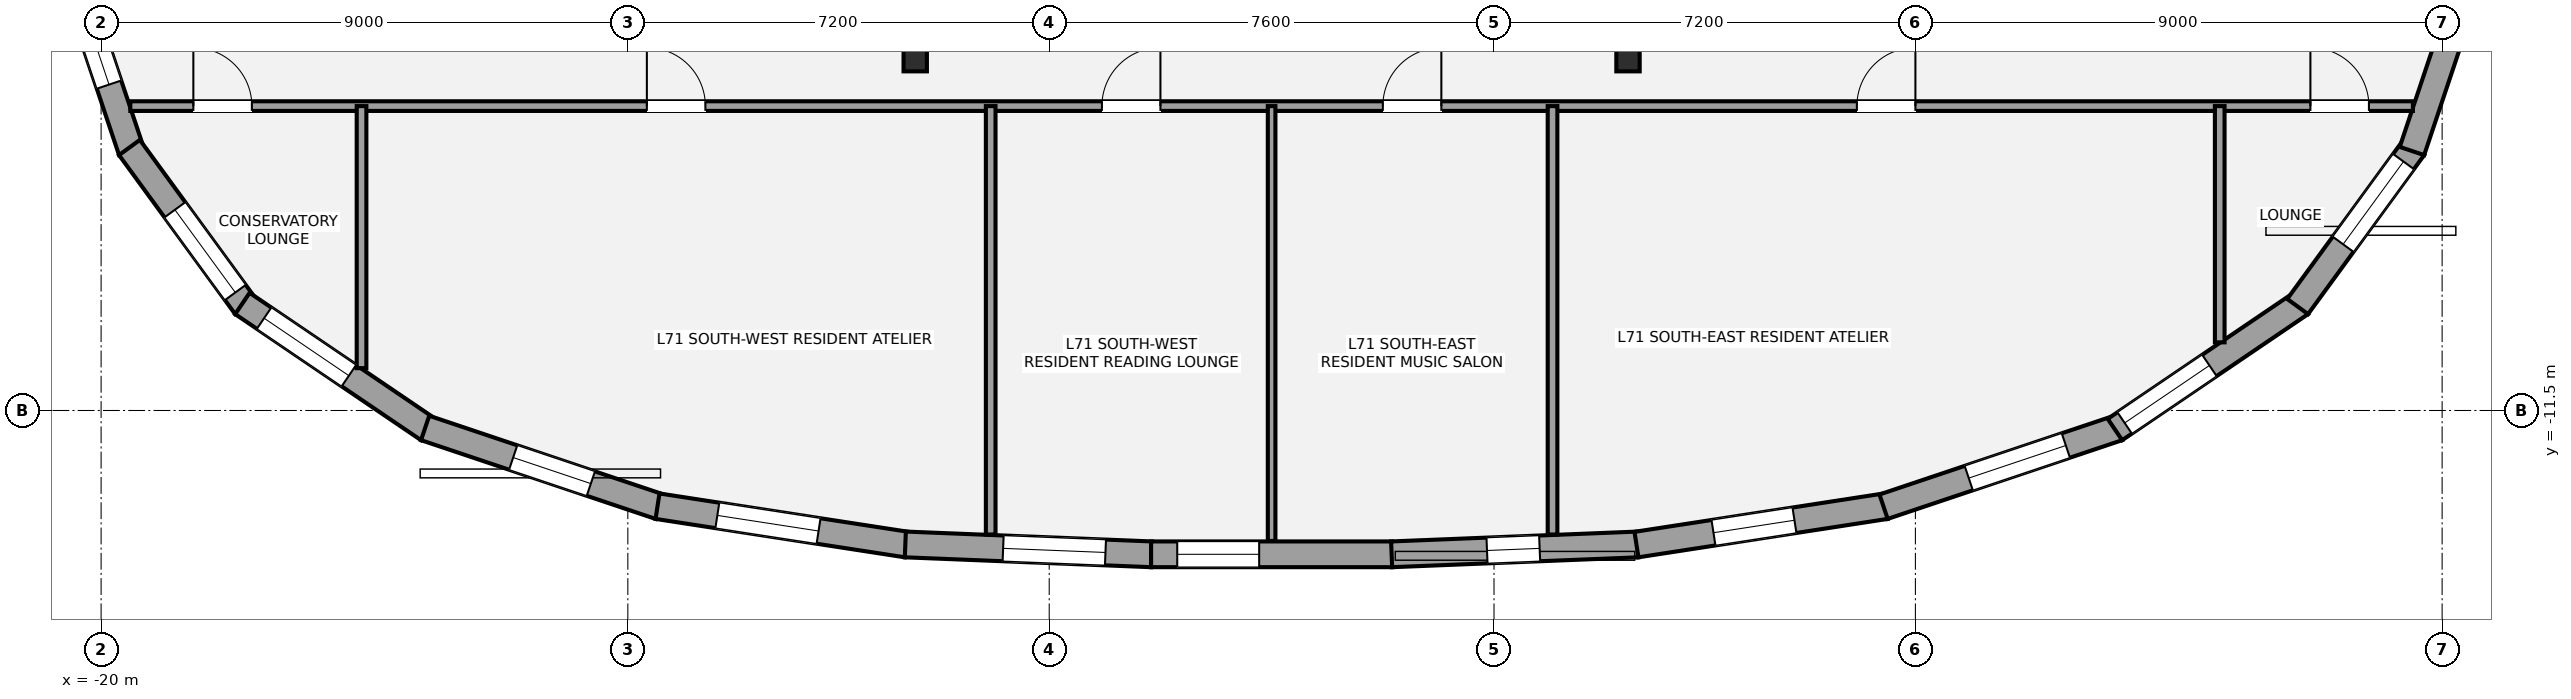
"""IFC4 building model, lengths in metres.
Left out: names, types, materials, properties, quantities, classifications, styles, units other than length and angle.
Written with IfcOpenShell. Run it as: python <this file> out.ifc"""

import sys

from ifc_helpers import new_model, si_unit, direction, frame, frame_2d, origin, origin_2d, place, context, subcontext, project, spatial, rectangle, i_section, extrude, element, fill, save


model = new_model("IFC4")
c1 = context("Model", 3, precision=1e-05, world=origin(), true_north=direction((0.0, 1.0)))
c2 = subcontext(c1, "Body", "Model", "MODEL_VIEW")
j1 = project(units=[si_unit("LENGTHUNIT", "METRE"), si_unit("PLANEANGLEUNIT", "RADIAN")], contexts=[c1])
p1 = place(None, origin())
s1 = spatial("IfcSite", under=j1, at=p1, CompositionType="ELEMENT")
p2 = place(p1, origin())
s2 = spatial("IfcBuilding", under=s1, at=p2, CompositionType="ELEMENT")
p3 = place(p2, frame((0.0, 0.0, 250.95)))
s3 = spatial("IfcBuildingStorey", under=s2, at=p3, CompositionType="ELEMENT", Elevation=250.95)
for number, where, z_axis, x_axis in (
    (1, (-6.09, -5.513, 0.0), (0.0, 0.0, 1.0), (1.0, 0.0, 0.0)),
    (2, (6.09, -5.513, 0.0), (0.0, 0.0, 1.0), (1.0, 0.0, 0.0)),
):
    element("IfcColumn", number, at=place(p3, frame(where, z_axis=z_axis, x_axis=x_axis)), inside=s3, PredefinedType="COLUMN", context=c2, shape_type="SweptSolid", body=[
        extrude(i_section(OverallWidth=0.399, OverallDepth=0.387, WebThickness=0.021, FlangeThickness=0.033, at=origin_2d()), origin(), (0.0, 0.0, 1.0), 3.15),
    ])
p4 = place(p3, frame((-19.485, -7.067, 0.0), z_axis=(0.0, 0.0, 1.0), x_axis=(-0.317622332961, 0.948217302945, 0.0)))
e3 = element("IfcWall", 3, at=p4, inside=s3, PredefinedType="STANDARD", context=c2, shape_type="SweptSolid", body=[
    extrude(rectangle(XDim=3.045, YDim=0.44, at=frame_2d((1.523, 0.0))), origin(), (0.0, 0.0, 1.0), 2.336),
])
p5 = place(p4, frame((1.196, 0.0, 0.58)))
e4 = element("IfcOpeningElement", 4, at=p5, cuts=e3, PredefinedType="OPENING", context=c2, shape_type="SweptSolid", body=[
    extrude(rectangle(XDim=1.4, YDim=1.55, at=frame_2d((0.7, 0.775))), frame((0.0, 0.23, 0.0), z_axis=(0.0, -1.0, 0.0), x_axis=(1.0, 0.0, 0.0)), (0.0, 0.0, 1.0), 0.46),
])
p6 = place(p3, frame((-17.531, -9.724, 0.0), z_axis=(0.0, 0.0, 1.0), x_axis=(-0.589698134284, 0.807623743102, 0.0)))
e5 = element("IfcWall", 5, at=p6, inside=s3, PredefinedType="STANDARD", context=c2, shape_type="SweptSolid", body=[
    extrude(rectangle(XDim=3.364, YDim=0.44, at=frame_2d((1.682, 0.0))), origin(), (0.0, 0.0, 1.0), 2.336),
])
p7 = place(p6, frame((0.297, 0.0, 0.55)))
e6 = element("IfcOpeningElement", 6, at=p7, cuts=e5, PredefinedType="OPENING", context=c2, shape_type="SweptSolid", body=[
    extrude(rectangle(XDim=1.75, YDim=1.55, at=frame_2d((0.875, 0.775))), frame((0.0, 0.23, 0.0), z_axis=(0.0, -1.0, 0.0), x_axis=(1.0, 0.0, 0.0)), (0.0, 0.0, 1.0), 0.46),
])
p8 = place(p3, frame((-14.41, -11.825, 0.0), z_axis=(0.0, 0.0, 1.0), x_axis=(-0.827707997274, 0.56115904274, 0.0)))
e7 = element("IfcWall", 7, at=p8, inside=s3, PredefinedType="STANDARD", context=c2, shape_type="SweptSolid", body=[
    extrude(rectangle(XDim=3.837, YDim=0.44, at=frame_2d((1.918, 0.0))), origin(), (0.0, 0.0, 1.0), 2.336),
])
p9 = place(p8, frame((1.639, 0.0, 0.55)))
e8 = element("IfcOpeningElement", 8, at=p9, cuts=e7, PredefinedType="OPENING", context=c2, shape_type="SweptSolid", body=[
    extrude(rectangle(XDim=1.75, YDim=1.55, at=frame_2d((0.875, 0.775))), frame((0.0, 0.23, 0.0), z_axis=(0.0, -1.0, 0.0), x_axis=(1.0, 0.0, 0.0)), (0.0, 0.0, 1.0), 0.46),
])
p10 = place(p3, frame((-10.456, -13.144, 0.0), z_axis=(0.0, 0.0, 1.0), x_axis=(-0.948005346594, 0.318254399545, 0.0)))
e9 = element("IfcWall", 9, at=p10, inside=s3, PredefinedType="STANDARD", context=c2, shape_type="SweptSolid", body=[
    extrude(rectangle(XDim=4.227, YDim=0.44, at=frame_2d((2.113, 0.0))), origin(), (0.0, 0.0, 1.0), 2.336),
])
p11 = place(p10, frame((1.24, 0.0, 0.55)))
e10 = element("IfcOpeningElement", 10, at=p11, cuts=e9, PredefinedType="OPENING", context=c2, shape_type="SweptSolid", body=[
    extrude(rectangle(XDim=1.4, YDim=1.55, at=frame_2d((0.7, 0.775))), frame((0.0, 0.23, 0.0), z_axis=(0.0, -1.0, 0.0), x_axis=(1.0, 0.0, 0.0)), (0.0, 0.0, 1.0), 0.46),
])
p12 = place(p3, frame((-6.234, -13.791, 0.0), z_axis=(0.0, 0.0, 1.0), x_axis=(-0.988352039028, 0.152184910389, 0.0)))
e11 = element("IfcWall", 11, at=p12, inside=s3, PredefinedType="STANDARD", context=c2, shape_type="SweptSolid", body=[
    extrude(rectangle(XDim=4.309, YDim=0.44, at=frame_2d((2.155, 0.0))), origin(), (0.0, 0.0, 1.0), 2.336),
])
p13 = place(p12, frame((1.525, 0.0, 0.55)))
e12 = element("IfcOpeningElement", 12, at=p13, cuts=e11, PredefinedType="OPENING", context=c2, shape_type="SweptSolid", body=[
    extrude(rectangle(XDim=1.75, YDim=1.55, at=frame_2d((0.875, 0.775))), frame((0.0, 0.23, 0.0), z_axis=(0.0, -1.0, 0.0), x_axis=(1.0, 0.0, 0.0)), (0.0, 0.0, 1.0), 0.46),
])
p14 = place(p3, frame((-2.051, -13.957, 0.0), z_axis=(0.0, 0.0, 1.0), x_axis=(-0.999195020948, 0.040116207618, 0.0)))
e13 = element("IfcWall", 13, at=p14, inside=s3, PredefinedType="STANDARD", context=c2, shape_type="SweptSolid", body=[
    extrude(rectangle(XDim=4.211, YDim=0.44, at=frame_2d((2.106, 0.0))), origin(), (0.0, 0.0, 1.0), 2.336),
])
p15 = place(p14, frame((0.789, 0.0, 0.55)))
e14 = element("IfcOpeningElement", 14, at=p15, cuts=e13, PredefinedType="OPENING", context=c2, shape_type="SweptSolid", body=[
    extrude(rectangle(XDim=1.75, YDim=1.55, at=frame_2d((0.875, 0.775))), frame((0.0, 0.23, 0.0), z_axis=(0.0, -1.0, 0.0), x_axis=(1.0, 0.0, 0.0)), (0.0, 0.0, 1.0), 0.46),
])
p16 = place(p3, frame((2.059, -13.957, 0.0), z_axis=(0.0, 0.0, 1.0), x_axis=(-1.0, 0.0, 0.0)))
e15 = element("IfcWall", 15, at=p16, inside=s3, PredefinedType="STANDARD", context=c2, shape_type="SweptSolid", body=[
    extrude(rectangle(XDim=4.119, YDim=0.44, at=frame_2d((2.059, 0.0))), origin(), (0.0, 0.0, 1.0), 2.336),
])
p17 = place(p16, frame((2.272, 0.0, 0.58)))
e16 = element("IfcOpeningElement", 16, at=p17, cuts=e15, PredefinedType="OPENING", context=c2, shape_type="SweptSolid", body=[
    extrude(rectangle(XDim=1.4, YDim=1.55, at=frame_2d((0.7, 0.775))), frame((0.0, 0.23, 0.0), z_axis=(0.0, -1.0, 0.0), x_axis=(1.0, 0.0, 0.0)), (0.0, 0.0, 1.0), 0.46),
])
p18 = place(p3, frame((6.259, -13.788, 0.0), z_axis=(0.0, 0.0, 1.0), x_axis=(-0.999195020948, -0.040116207618, 0.0)))
e17 = element("IfcWall", 17, at=p18, inside=s3, PredefinedType="STANDARD", context=c2, shape_type="SweptSolid", body=[
    extrude(rectangle(XDim=4.211, YDim=0.44, at=frame_2d((2.106, 0.0))), origin(), (0.0, 0.0, 1.0), 2.336),
])
p19 = place(p18, frame((1.68, 0.0, 0.58)))
e18 = element("IfcOpeningElement", 18, at=p19, cuts=e17, PredefinedType="OPENING", context=c2, shape_type="SweptSolid", body=[
    extrude(rectangle(XDim=0.9, YDim=1.35, at=frame_2d((0.45, 0.675))), frame((0.0, 0.23, 0.0), z_axis=(0.0, -1.0, 0.0), x_axis=(1.0, 0.0, 0.0)), (0.0, 0.0, 1.0), 0.46),
])
p20 = place(p3, frame((10.493, -13.135, 0.0), z_axis=(0.0, 0.0, 1.0), x_axis=(-0.988352039028, -0.152184910389, 0.0)))
e19 = element("IfcWall", 19, at=p20, inside=s3, PredefinedType="STANDARD", context=c2, shape_type="SweptSolid", body=[
    extrude(rectangle(XDim=4.309, YDim=0.44, at=frame_2d((2.155, 0.0))), origin(), (0.0, 0.0, 1.0), 2.336),
])
p21 = place(p20, frame((1.577, 0.0, 0.55)))
e20 = element("IfcOpeningElement", 20, at=p21, cuts=e19, PredefinedType="OPENING", context=c2, shape_type="SweptSolid", body=[
    extrude(rectangle(XDim=1.4, YDim=1.55, at=frame_2d((0.7, 0.775))), frame((0.0, 0.23, 0.0), z_axis=(0.0, -1.0, 0.0), x_axis=(1.0, 0.0, 0.0)), (0.0, 0.0, 1.0), 0.46),
])
p22 = place(p3, frame((14.463, -11.799, 0.0), z_axis=(0.0, 0.0, 1.0), x_axis=(-0.948005346594, -0.318254399545, 0.0)))
e21 = element("IfcWall", 21, at=p22, inside=s3, PredefinedType="STANDARD", context=c2, shape_type="SweptSolid", body=[
    extrude(rectangle(XDim=4.227, YDim=0.44, at=frame_2d((2.113, 0.0))), origin(), (0.0, 0.0, 1.0), 2.336),
])
p23 = place(p22, frame((0.942, 0.0, 0.55)))
e22 = element("IfcOpeningElement", 22, at=p23, cuts=e21, PredefinedType="OPENING", context=c2, shape_type="SweptSolid", body=[
    extrude(rectangle(XDim=1.75, YDim=1.55, at=frame_2d((0.875, 0.775))), frame((0.0, 0.23, 0.0), z_axis=(0.0, -1.0, 0.0), x_axis=(1.0, 0.0, 0.0)), (0.0, 0.0, 1.0), 0.46),
])
p24 = place(p3, frame((17.586, -9.672, 0.0), z_axis=(0.0, 0.0, 1.0), x_axis=(-0.827707997274, -0.56115904274, 0.0)))
e23 = element("IfcWall", 23, at=p24, inside=s3, PredefinedType="STANDARD", context=c2, shape_type="SweptSolid", body=[
    extrude(rectangle(XDim=3.837, YDim=0.44, at=frame_2d((1.918, 0.0))), origin(), (0.0, 0.0, 1.0), 2.336),
])
p25 = place(p24, frame((1.887, 0.0, 0.55)))
e24 = element("IfcOpeningElement", 24, at=p25, cuts=e23, PredefinedType="OPENING", context=c2, shape_type="SweptSolid", body=[
    extrude(rectangle(XDim=1.75, YDim=1.55, at=frame_2d((0.875, 0.775))), frame((0.0, 0.23, 0.0), z_axis=(0.0, -1.0, 0.0), x_axis=(1.0, 0.0, 0.0)), (0.0, 0.0, 1.0), 0.46),
])
p26 = place(p3, frame((19.515, -7.007, 0.0), z_axis=(0.0, 0.0, 1.0), x_axis=(-0.589698134284, -0.807623743102, 0.0)))
e25 = element("IfcWall", 25, at=p26, inside=s3, PredefinedType="STANDARD", context=c2, shape_type="SweptSolid", body=[
    extrude(rectangle(XDim=3.364, YDim=0.44, at=frame_2d((1.682, 0.0))), origin(), (0.0, 0.0, 1.0), 2.336),
])
p27 = place(p26, frame((0.297, 0.0, 0.55)))
e26 = element("IfcOpeningElement", 26, at=p27, cuts=e25, PredefinedType="OPENING", context=c2, shape_type="SweptSolid", body=[
    extrude(rectangle(XDim=1.75, YDim=1.55, at=frame_2d((0.875, 0.775))), frame((0.0, 0.23, 0.0), z_axis=(0.0, -1.0, 0.0), x_axis=(1.0, 0.0, 0.0)), (0.0, 0.0, 1.0), 0.46),
])
p28 = place(p3, frame((20.452, -4.179, 0.0), z_axis=(0.0, 0.0, 1.0), x_axis=(-0.317622332961, -0.948217302945, 0.0)))
e27 = element("IfcWall", 27, at=p28, inside=s3, PredefinedType="STANDARD", context=c2, shape_type="SweptSolid", body=[
    extrude(rectangle(XDim=3.045, YDim=0.44, at=frame_2d((1.523, 0.0))), origin(), (0.0, 0.0, 1.0), 2.336),
])
p29 = place(p3, frame((-19.501, -6.3, 0.0), z_axis=(0.0, 0.0, 1.0), x_axis=(1.0, 0.0, 0.0)))
e28 = element("IfcWall", 28, at=p29, inside=s3, PredefinedType="PARTITIONING", context=c2, shape_type="SweptSolid", body=[
    extrude(rectangle(XDim=39.002, YDim=0.165, at=frame_2d((19.501, 0.0))), origin(), (0.0, 0.0, 1.0), 2.423),
])
p30 = place(p29, frame((1.077, 0.0, 0.0)))
e29 = element("IfcOpeningElement", 29, at=p30, cuts=e28, PredefinedType="OPENING", context=c2, shape_type="SweptSolid", body=[
    extrude(rectangle(XDim=1.0, YDim=2.15, at=frame_2d((0.5, 1.075))), frame((0.0, 0.093, 0.0), z_axis=(0.0, -1.0, 0.0), x_axis=(1.0, 0.0, 0.0)), (0.0, 0.0, 1.0), 0.185),
])
p31 = place(p29, frame((37.25, 0.0, 0.0)))
e30 = element("IfcOpeningElement", 30, at=p31, cuts=e28, PredefinedType="OPENING", context=c2, shape_type="SweptSolid", body=[
    extrude(rectangle(XDim=1.0, YDim=2.15, at=frame_2d((0.5, 1.075))), frame((0.0, 0.093, 0.0), z_axis=(0.0, -1.0, 0.0), x_axis=(1.0, 0.0, 0.0)), (0.0, 0.0, 1.0), 0.185),
])
p32 = place(p29, frame((16.601, 0.0, 0.0)))
e31 = element("IfcOpeningElement", 31, at=p32, cuts=e28, PredefinedType="OPENING", context=c2, shape_type="SweptSolid", body=[
    extrude(rectangle(XDim=1.0, YDim=2.15, at=frame_2d((0.5, 1.075))), frame((0.0, 0.093, 0.0), z_axis=(0.0, -1.0, 0.0), x_axis=(1.0, 0.0, 0.0)), (0.0, 0.0, 1.0), 0.185),
])
p33 = place(p29, frame((21.401, 0.0, 0.0)))
e32 = element("IfcOpeningElement", 32, at=p33, cuts=e28, PredefinedType="OPENING", context=c2, shape_type="SweptSolid", body=[
    extrude(rectangle(XDim=1.0, YDim=2.15, at=frame_2d((0.5, 1.075))), frame((0.0, 0.093, 0.0), z_axis=(0.0, -1.0, 0.0), x_axis=(1.0, 0.0, 0.0)), (0.0, 0.0, 1.0), 0.185),
])
p34 = place(p29, frame((8.826, 0.0, 0.0)))
e33 = element("IfcOpeningElement", 33, at=p34, cuts=e28, PredefinedType="OPENING", context=c2, shape_type="SweptSolid", body=[
    extrude(rectangle(XDim=1.0, YDim=2.15, at=frame_2d((0.5, 1.075))), frame((0.0, 0.093, 0.0), z_axis=(0.0, -1.0, 0.0), x_axis=(1.0, 0.0, 0.0)), (0.0, 0.0, 1.0), 0.185),
])
p35 = place(p29, frame((29.501, 0.0, 0.0)))
e34 = element("IfcOpeningElement", 34, at=p35, cuts=e28, PredefinedType="OPENING", context=c2, shape_type="SweptSolid", body=[
    extrude(rectangle(XDim=1.0, YDim=2.15, at=frame_2d((0.5, 1.075))), frame((0.0, 0.093, 0.0), z_axis=(0.0, -1.0, 0.0), x_axis=(1.0, 0.0, 0.0)), (0.0, 0.0, 1.0), 0.185),
])
p36 = place(p3, frame((-15.55, -10.777, 0.0), z_axis=(0.0, 0.0, 1.0), x_axis=(0.0, 1.0, 0.0)))
e35 = element("IfcWall", 35, at=p36, inside=s3, PredefinedType="PARTITIONING", context=c2, shape_type="SweptSolid", body=[
    extrude(rectangle(XDim=4.477, YDim=0.165, at=frame_2d((2.238, 0.0))), origin(), (0.0, 0.0, 1.0), 2.423),
])
p37 = place(p3, frame((16.2, -10.336, 0.0), z_axis=(0.0, 0.0, 1.0), x_axis=(0.0, 1.0, 0.0)))
e36 = element("IfcWall", 36, at=p37, inside=s3, PredefinedType="PARTITIONING", context=c2, shape_type="SweptSolid", body=[
    extrude(rectangle(XDim=4.036, YDim=0.165, at=frame_2d((2.018, 0.0))), origin(), (0.0, 0.0, 1.0), 2.423),
])
p38 = place(p3, frame((-4.8, -13.619, 0.0), z_axis=(0.0, 0.0, 1.0), x_axis=(0.0, 1.0, 0.0)))
e37 = element("IfcWall", 37, at=p38, inside=s3, PredefinedType="PARTITIONING", context=c2, shape_type="SweptSolid", body=[
    extrude(rectangle(XDim=7.319, YDim=0.165, at=frame_2d((3.659, 0.0))), origin(), (0.0, 0.0, 1.0), 2.423),
])
p39 = place(p3, frame((4.8, -13.619, 0.0), z_axis=(0.0, 0.0, 1.0), x_axis=(0.0, 1.0, 0.0)))
e38 = element("IfcWall", 38, at=p39, inside=s3, PredefinedType="PARTITIONING", context=c2, shape_type="SweptSolid", body=[
    extrude(rectangle(XDim=7.319, YDim=0.165, at=frame_2d((3.659, 0.0))), origin(), (0.0, 0.0, 1.0), 2.97),
])
p40 = place(p3, frame((0.0, -13.729, 0.0), z_axis=(0.0, 0.0, 1.0), x_axis=(0.0, 1.0, 0.0)))
e39 = element("IfcWall", 39, at=p40, inside=s3, PredefinedType="PARTITIONING", context=c2, shape_type="SweptSolid", body=[
    extrude(rectangle(XDim=7.429, YDim=0.13, at=frame_2d((3.714, 0.0))), origin(), (0.0, 0.0, 1.0), 2.423),
])
p41 = place(p5, origin())
e40 = element("IfcWindow", 40, at=p41, inside=s3, PartitioningType="SINGLE_PANEL", PredefinedType="WINDOW", context=c2, shape_type="SweptSolid", body=[
    extrude(rectangle(XDim=1.4, YDim=1.55, at=frame_2d((0.7, 0.775))), frame((0.0, -0.01, 0.0), z_axis=(0.0, -1.0, 0.0), x_axis=(1.0, 0.0, 0.0)), (0.0, 0.0, 1.0), 0.06),
])
fill(e4, e40)
p42 = place(p7, origin())
e41 = element("IfcWindow", 41, at=p42, inside=s3, PartitioningType="SINGLE_PANEL", PredefinedType="WINDOW", context=c2, shape_type="SweptSolid", body=[
    extrude(rectangle(XDim=1.75, YDim=1.55, at=frame_2d((0.875, 0.775))), frame((0.0, -0.01, 0.0), z_axis=(0.0, -1.0, 0.0), x_axis=(1.0, 0.0, 0.0)), (0.0, 0.0, 1.0), 0.06),
])
fill(e6, e41)
p43 = place(p9, origin())
e42 = element("IfcWindow", 42, at=p43, inside=s3, PartitioningType="SINGLE_PANEL", PredefinedType="WINDOW", context=c2, shape_type="SweptSolid", body=[
    extrude(rectangle(XDim=1.75, YDim=1.55, at=frame_2d((0.875, 0.775))), frame((0.0, -0.01, 0.0), z_axis=(0.0, -1.0, 0.0), x_axis=(1.0, 0.0, 0.0)), (0.0, 0.0, 1.0), 0.06),
])
fill(e8, e42)
p44 = place(p11, origin())
e43 = element("IfcWindow", 43, at=p44, inside=s3, PartitioningType="SINGLE_PANEL", PredefinedType="WINDOW", context=c2, shape_type="SweptSolid", body=[
    extrude(rectangle(XDim=1.4, YDim=1.55, at=frame_2d((0.7, 0.775))), frame((0.0, -0.01, 0.0), z_axis=(0.0, -1.0, 0.0), x_axis=(1.0, 0.0, 0.0)), (0.0, 0.0, 1.0), 0.06),
])
fill(e10, e43)
p45 = place(p13, origin())
e44 = element("IfcWindow", 44, at=p45, inside=s3, PartitioningType="SINGLE_PANEL", PredefinedType="WINDOW", context=c2, shape_type="SweptSolid", body=[
    extrude(rectangle(XDim=1.75, YDim=1.55, at=frame_2d((0.875, 0.775))), frame((0.0, -0.01, 0.0), z_axis=(0.0, -1.0, 0.0), x_axis=(1.0, 0.0, 0.0)), (0.0, 0.0, 1.0), 0.06),
])
fill(e12, e44)
p46 = place(p15, origin())
e45 = element("IfcWindow", 45, at=p46, inside=s3, PartitioningType="SINGLE_PANEL", PredefinedType="WINDOW", context=c2, shape_type="SweptSolid", body=[
    extrude(rectangle(XDim=1.75, YDim=1.55, at=frame_2d((0.875, 0.775))), frame((0.0, -0.01, 0.0), z_axis=(0.0, -1.0, 0.0), x_axis=(1.0, 0.0, 0.0)), (0.0, 0.0, 1.0), 0.06),
])
fill(e14, e45)
p47 = place(p17, origin())
e46 = element("IfcWindow", 46, at=p47, inside=s3, PartitioningType="SINGLE_PANEL", PredefinedType="WINDOW", context=c2, shape_type="SweptSolid", body=[
    extrude(rectangle(XDim=1.4, YDim=1.55, at=frame_2d((0.7, 0.775))), frame((0.0, -0.01, 0.0), z_axis=(0.0, -1.0, 0.0), x_axis=(1.0, 0.0, 0.0)), (0.0, 0.0, 1.0), 0.06),
])
fill(e16, e46)
p48 = place(p19, origin())
e47 = element("IfcWindow", 47, at=p48, inside=s3, PartitioningType="SINGLE_PANEL", PredefinedType="WINDOW", context=c2, shape_type="SweptSolid", body=[
    extrude(rectangle(XDim=0.9, YDim=1.35, at=frame_2d((0.45, 0.675))), frame((0.0, -0.01, 0.0), z_axis=(0.0, -1.0, 0.0), x_axis=(1.0, 0.0, 0.0)), (0.0, 0.0, 1.0), 0.06),
])
fill(e18, e47)
p49 = place(p21, origin())
e48 = element("IfcWindow", 48, at=p49, inside=s3, PartitioningType="SINGLE_PANEL", PredefinedType="WINDOW", context=c2, shape_type="SweptSolid", body=[
    extrude(rectangle(XDim=1.4, YDim=1.55, at=frame_2d((0.7, 0.775))), frame((0.0, -0.01, 0.0), z_axis=(0.0, -1.0, 0.0), x_axis=(1.0, 0.0, 0.0)), (0.0, 0.0, 1.0), 0.06),
])
fill(e20, e48)
p50 = place(p23, origin())
e49 = element("IfcWindow", 49, at=p50, inside=s3, PartitioningType="SINGLE_PANEL", PredefinedType="WINDOW", context=c2, shape_type="SweptSolid", body=[
    extrude(rectangle(XDim=1.75, YDim=1.55, at=frame_2d((0.875, 0.775))), frame((0.0, -0.01, 0.0), z_axis=(0.0, -1.0, 0.0), x_axis=(1.0, 0.0, 0.0)), (0.0, 0.0, 1.0), 0.06),
])
fill(e22, e49)
p51 = place(p25, origin())
e50 = element("IfcWindow", 50, at=p51, inside=s3, PartitioningType="SINGLE_PANEL", PredefinedType="WINDOW", context=c2, shape_type="SweptSolid", body=[
    extrude(rectangle(XDim=1.75, YDim=1.55, at=frame_2d((0.875, 0.775))), frame((0.0, -0.01, 0.0), z_axis=(0.0, -1.0, 0.0), x_axis=(1.0, 0.0, 0.0)), (0.0, 0.0, 1.0), 0.06),
])
fill(e24, e50)
p52 = place(p27, origin())
e51 = element("IfcWindow", 51, at=p52, inside=s3, PartitioningType="SINGLE_PANEL", PredefinedType="WINDOW", context=c2, shape_type="SweptSolid", body=[
    extrude(rectangle(XDim=1.75, YDim=1.55, at=frame_2d((0.875, 0.775))), frame((0.0, -0.01, 0.0), z_axis=(0.0, -1.0, 0.0), x_axis=(1.0, 0.0, 0.0)), (0.0, 0.0, 1.0), 0.06),
])
fill(e26, e51)
p53 = place(p30, origin())
e52 = element("IfcDoor", 52, at=p53, inside=s3, OperationType="SINGLE_SWING_LEFT", PredefinedType="DOOR", context=c2, shape_type="SweptSolid", body=[
    extrude(rectangle(XDim=1.0, YDim=2.15, at=frame_2d((0.5, 1.075))), frame((0.0, 0.025, 0.0), z_axis=(0.0, -1.0, 0.0), x_axis=(1.0, 0.0, 0.0)), (0.0, 0.0, 1.0), 0.05),
])
fill(e29, e52)
p54 = place(p31, origin())
e53 = element("IfcDoor", 53, at=p54, inside=s3, OperationType="SINGLE_SWING_LEFT", PredefinedType="DOOR", context=c2, shape_type="SweptSolid", body=[
    extrude(rectangle(XDim=1.0, YDim=2.15, at=frame_2d((0.5, 1.075))), frame((0.0, 0.025, 0.0), z_axis=(0.0, -1.0, 0.0), x_axis=(1.0, 0.0, 0.0)), (0.0, 0.0, 1.0), 0.05),
])
fill(e30, e53)
p55 = place(p32, origin())
e54 = element("IfcDoor", 54, at=p55, inside=s3, OperationType="SINGLE_SWING_RIGHT", PredefinedType="DOOR", context=c2, shape_type="SweptSolid", body=[
    extrude(rectangle(XDim=1.0, YDim=2.15, at=frame_2d((0.5, 1.075))), frame((0.0, 0.025, 0.0), z_axis=(0.0, -1.0, 0.0), x_axis=(1.0, 0.0, 0.0)), (0.0, 0.0, 1.0), 0.05),
])
fill(e31, e54)
p56 = place(p33, origin())
e55 = element("IfcDoor", 55, at=p56, inside=s3, OperationType="SINGLE_SWING_RIGHT", PredefinedType="DOOR", context=c2, shape_type="SweptSolid", body=[
    extrude(rectangle(XDim=1.0, YDim=2.15, at=frame_2d((0.5, 1.075))), frame((0.0, 0.025, 0.0), z_axis=(0.0, -1.0, 0.0), x_axis=(1.0, 0.0, 0.0)), (0.0, 0.0, 1.0), 0.05),
])
fill(e32, e55)
p57 = place(p34, origin())
e56 = element("IfcDoor", 56, at=p57, inside=s3, OperationType="SINGLE_SWING_LEFT", PredefinedType="DOOR", context=c2, shape_type="SweptSolid", body=[
    extrude(rectangle(XDim=1.0, YDim=2.15, at=frame_2d((0.5, 1.075))), frame((0.0, 0.025, 0.0), z_axis=(0.0, -1.0, 0.0), x_axis=(1.0, 0.0, 0.0)), (0.0, 0.0, 1.0), 0.05),
])
fill(e33, e56)
p58 = place(p35, origin())
e57 = element("IfcDoor", 57, at=p58, inside=s3, OperationType="SINGLE_SWING_RIGHT", PredefinedType="DOOR", context=c2, shape_type="SweptSolid", body=[
    extrude(rectangle(XDim=1.0, YDim=2.15, at=frame_2d((0.5, 1.075))), frame((0.0, 0.025, 0.0), z_axis=(0.0, -1.0, 0.0), x_axis=(1.0, 0.0, 0.0)), (0.0, 0.0, 1.0), 0.05),
])
fill(e34, e57)
save(model, sys.argv[1])
